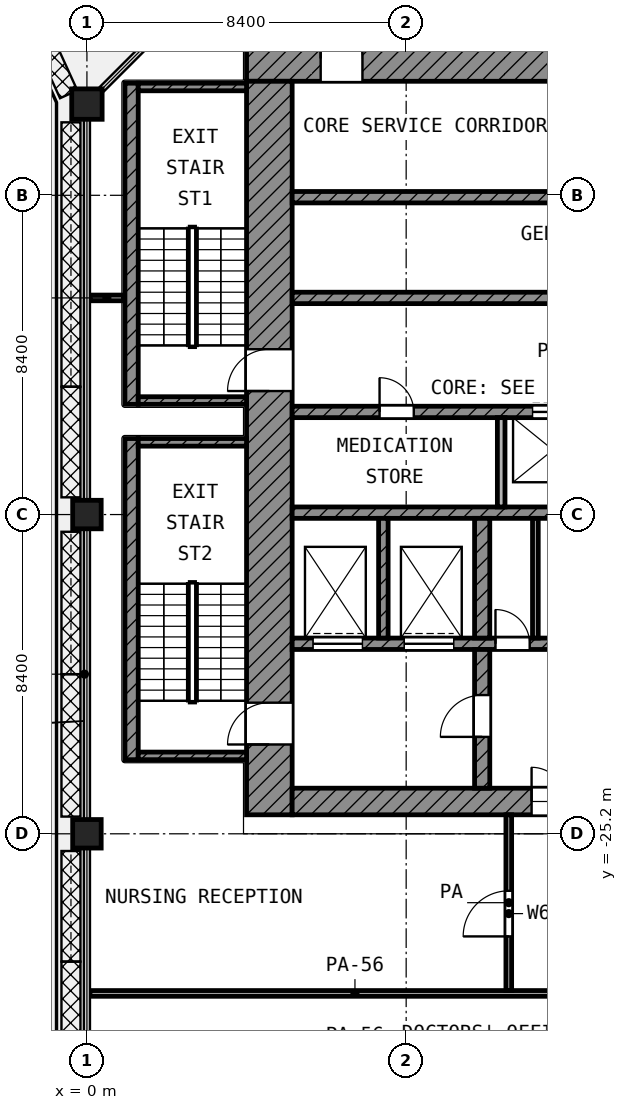
"""IFC4 building model, lengths in metres.
Left out: names, types, materials, properties, quantities, classifications, styles, units other than length and angle.
Written with IfcOpenShell. Run it as: python <this file> out.ifc"""

import sys

from ifc_helpers import new_model, si_unit, direction, frame, frame_2d, origin, origin_2d, place, context, subcontext, project, spatial, rectangle, extrude, element, fill, save


model = new_model("IFC4")
c1 = context("Model", 3, precision=1e-05, world=origin(), true_north=direction((0.0, 1.0)))
c2 = subcontext(c1, "Body", "Model", "MODEL_VIEW")
j1 = project(units=[si_unit("LENGTHUNIT", "METRE"), si_unit("PLANEANGLEUNIT", "RADIAN")], contexts=[c1])
p1 = place(None, origin())
s1 = spatial("IfcSite", under=j1, at=p1, CompositionType="ELEMENT")
p2 = place(p1, origin())
s2 = spatial("IfcBuilding", under=s1, at=p2, CompositionType="ELEMENT")
p3 = place(p2, frame((0.0, 0.0, 298.6)))
s3 = spatial("IfcBuildingStorey", under=s2, at=p3, CompositionType="ELEMENT", Elevation=298.6)
p4 = place(p3, frame((0.0, -6.0, 0.0), z_axis=(0.0, 0.0, 1.0), x_axis=(1.0, 0.0, 0.0)))
e1 = element("IfcColumn", 1, at=p4, inside=s3, PredefinedType="COLUMN", context=c2, shape_type="SweptSolid", body=[
    extrude(rectangle(XDim=0.8, YDim=0.8, at=origin_2d()), origin(), (0.0, 0.0, 1.0), 4.2),
])
for number, where, z_axis, x_axis in (
    (2, (0.0, -16.8, 0.0), (0.0, 0.0, 1.0), (1.0, 0.0, 0.0)),
    (3, (0.0, -25.2, 0.0), (0.0, 0.0, 1.0), (1.0, 0.0, 0.0)),
):
    element("IfcColumn", number, at=place(p3, frame(where, z_axis=z_axis, x_axis=x_axis)), inside=s3, PredefinedType="COLUMN", context=c2, shape_type="SweptSolid", body=[
        extrude(rectangle(XDim=0.75, YDim=0.75, at=origin_2d()), origin(), (0.0, 0.0, 1.0), 4.2),
    ])
p5 = place(p3, frame((4.2, -4.8, 0.0), z_axis=(0.0, 0.0, 1.0), x_axis=(1.0, 0.0, 0.0)))
e4 = element("IfcWall", 4, at=p5, inside=s3, PredefinedType="SHEAR", context=c2, shape_type="SweptSolid", body=[
    extrude(rectangle(XDim=20.5, YDim=1.2, at=frame_2d((10.25, 0.0))), origin(), (0.0, 0.0, 1.0), 3.6),
])
p6 = place(p5, frame((1.95, 0.0, 0.0)))
e5 = element("IfcOpeningElement", 5, at=p6, cuts=e4, PredefinedType="OPENING", context=c2, shape_type="SweptSolid", body=[
    extrude(rectangle(XDim=1.1, YDim=2.1, at=frame_2d((0.55, 1.05))), frame((0.0, 0.61, 0.0), z_axis=(0.0, -1.0, 0.0), x_axis=(1.0, 0.0, 0.0)), (0.0, 0.0, 1.0), 1.22),
])
p7 = place(p5, frame((17.95, 0.0, 0.0)))
e6 = element("IfcOpeningElement", 6, at=p7, cuts=e4, PredefinedType="OPENING", context=c2, shape_type="SweptSolid", body=[
    extrude(rectangle(XDim=1.1, YDim=2.1, at=frame_2d((0.55, 1.05))), frame((0.0, 0.61, 0.0), z_axis=(0.0, -1.0, 0.0), x_axis=(1.0, 0.0, 0.0)), (0.0, 0.0, 1.0), 1.22),
])
p8 = place(p3, frame((4.8, -24.7, 0.0), z_axis=(0.0, 0.0, 1.0), x_axis=(0.0, 1.0, 0.0)))
e7 = element("IfcWall", 7, at=p8, inside=s3, PredefinedType="SHEAR", context=c2, shape_type="SweptSolid", body=[
    extrude(rectangle(XDim=19.3, YDim=1.2, at=frame_2d((9.65, 0.0))), origin(), (0.0, 0.0, 1.0), 3.6),
])
p9 = place(p8, frame((11.15, 0.0, 0.0)))
e8 = element("IfcOpeningElement", 8, at=p9, cuts=e7, PredefinedType="OPENING", context=c2, shape_type="SweptSolid", body=[
    extrude(rectangle(XDim=1.1, YDim=2.1, at=frame_2d((0.55, 1.05))), frame((0.0, 0.61, 0.0), z_axis=(0.0, -1.0, 0.0), x_axis=(1.0, 0.0, 0.0)), (0.0, 0.0, 1.0), 1.22),
])
p10 = place(p8, frame((1.85, 0.0, 0.0)))
e9 = element("IfcOpeningElement", 9, at=p10, cuts=e7, PredefinedType="OPENING", context=c2, shape_type="SweptSolid", body=[
    extrude(rectangle(XDim=1.1, YDim=2.1, at=frame_2d((0.55, 1.05))), frame((0.0, 0.61, 0.0), z_axis=(0.0, -1.0, 0.0), x_axis=(1.0, 0.0, 0.0)), (0.0, 0.0, 1.0), 1.22),
])
p11 = place(p3, frame((5.4, -24.35, 0.0), z_axis=(0.0, 0.0, 1.0), x_axis=(1.0, 0.0, 0.0)))
e10 = element("IfcWall", 10, at=p11, inside=s3, PredefinedType="SHEAR", context=c2, shape_type="SweptSolid", body=[
    extrude(rectangle(XDim=18.6, YDim=0.7, at=frame_2d((9.3, 0.0))), origin(), (0.0, 0.0, 1.0), 3.6),
])
p12 = place(p11, frame((6.3, 0.0, 0.0)))
e11 = element("IfcOpeningElement", 11, at=p12, cuts=e10, PredefinedType="OPENING", context=c2, shape_type="SweptSolid", body=[
    extrude(rectangle(XDim=1.8, YDim=2.1, at=frame_2d((0.9, 1.05))), frame((0.0, 0.36, 0.0), z_axis=(0.0, -1.0, 0.0), x_axis=(1.0, 0.0, 0.0)), (0.0, 0.0, 1.0), 0.72),
])
p13 = place(p3, frame((5.4, -8.45, 0.0), z_axis=(0.0, 0.0, 1.0), x_axis=(1.0, 0.0, 0.0)))
e12 = element("IfcWall", 12, at=p13, inside=s3, PredefinedType="SHEAR", context=c2, shape_type="SweptSolid", body=[
    extrude(rectangle(XDim=16.65, YDim=0.3, at=frame_2d((8.325, 0.0))), origin(), (0.0, 0.0, 1.0), 3.6),
])
p14 = place(p3, frame((5.4, -11.1, 0.0), z_axis=(0.0, 0.0, 1.0), x_axis=(1.0, 0.0, 0.0)))
e13 = element("IfcWall", 13, at=p14, inside=s3, PredefinedType="SHEAR", context=c2, shape_type="SweptSolid", body=[
    extrude(rectangle(XDim=16.65, YDim=0.3, at=frame_2d((8.325, 0.0))), origin(), (0.0, 0.0, 1.0), 3.6),
])
p15 = place(p14, frame((7.8, 0.0, 0.0)))
e14 = element("IfcOpeningElement", 14, at=p15, cuts=e13, PredefinedType="OPENING", context=c2, shape_type="SweptSolid", body=[
    extrude(rectangle(XDim=0.9, YDim=2.1, at=frame_2d((0.45, 1.05))), frame((0.0, 0.16, 0.0), z_axis=(0.0, -1.0, 0.0), x_axis=(1.0, 0.0, 0.0)), (0.0, 0.0, 1.0), 0.32),
])
p16 = place(p3, frame((5.4, -14.1, 0.0), z_axis=(0.0, 0.0, 1.0), x_axis=(1.0, 0.0, 0.0)))
e15 = element("IfcWall", 15, at=p16, inside=s3, PredefinedType="SHEAR", context=c2, shape_type="SweptSolid", body=[
    extrude(rectangle(XDim=16.65, YDim=0.3, at=frame_2d((8.325, 0.0))), origin(), (0.0, 0.0, 1.0), 3.6),
])
p17 = place(p16, frame((6.325, 0.0, 0.0)))
e16 = element("IfcOpeningElement", 16, at=p17, cuts=e15, PredefinedType="OPENING", context=c2, shape_type="SweptSolid", body=[
    extrude(rectangle(XDim=1.1, YDim=2.1, at=frame_2d((0.55, 1.05))), frame((0.0, 0.16, 0.0), z_axis=(0.0, -1.0, 0.0), x_axis=(1.0, 0.0, 0.0)), (0.0, 0.0, 1.0), 0.32),
])
p18 = place(p16, frame((9.075, 0.0, 0.0)))
e17 = element("IfcOpeningElement", 17, at=p18, cuts=e15, PredefinedType="OPENING", context=c2, shape_type="SweptSolid", body=[
    extrude(rectangle(XDim=1.1, YDim=2.1, at=frame_2d((0.55, 1.05))), frame((0.0, 0.16, 0.0), z_axis=(0.0, -1.0, 0.0), x_axis=(1.0, 0.0, 0.0)), (0.0, 0.0, 1.0), 0.32),
])
p19 = place(p16, frame((11.825, 0.0, 0.0)))
e18 = element("IfcOpeningElement", 18, at=p19, cuts=e15, PredefinedType="OPENING", context=c2, shape_type="SweptSolid", body=[
    extrude(rectangle(XDim=1.1, YDim=2.1, at=frame_2d((0.55, 1.05))), frame((0.0, 0.16, 0.0), z_axis=(0.0, -1.0, 0.0), x_axis=(1.0, 0.0, 0.0)), (0.0, 0.0, 1.0), 0.32),
])
p20 = place(p16, frame((14.575, 0.0, 0.0)))
e19 = element("IfcOpeningElement", 19, at=p20, cuts=e15, PredefinedType="OPENING", context=c2, shape_type="SweptSolid", body=[
    extrude(rectangle(XDim=1.1, YDim=2.1, at=frame_2d((0.55, 1.05))), frame((0.0, 0.16, 0.0), z_axis=(0.0, -1.0, 0.0), x_axis=(1.0, 0.0, 0.0)), (0.0, 0.0, 1.0), 0.32),
])
p21 = place(p16, frame((2.3, 0.0, 0.0)))
e20 = element("IfcOpeningElement", 20, at=p21, cuts=e15, PredefinedType="OPENING", context=c2, shape_type="SweptSolid", body=[
    extrude(rectangle(XDim=0.9, YDim=2.1, at=frame_2d((0.45, 1.05))), frame((0.0, 0.16, 0.0), z_axis=(0.0, -1.0, 0.0), x_axis=(1.0, 0.0, 0.0)), (0.0, 0.0, 1.0), 0.32),
])
p22 = place(p3, frame((5.4, -16.75, 0.0), z_axis=(0.0, 0.0, 1.0), x_axis=(1.0, 0.0, 0.0)))
e21 = element("IfcWall", 21, at=p22, inside=s3, PredefinedType="SHEAR", context=c2, shape_type="SweptSolid", body=[
    extrude(rectangle(XDim=16.65, YDim=0.3, at=frame_2d((8.325, 0.0))), origin(), (0.0, 0.0, 1.0), 3.6),
])
p23 = place(p3, frame((5.4, -20.2, 0.0), z_axis=(0.0, 0.0, 1.0), x_axis=(1.0, 0.0, 0.0)))
e22 = element("IfcWall", 22, at=p23, inside=s3, PredefinedType="SHEAR", context=c2, shape_type="SweptSolid", body=[
    extrude(rectangle(XDim=14.65, YDim=0.3, at=frame_2d((7.325, 0.0))), origin(), (0.0, 0.0, 1.0), 3.6),
])
p24 = place(p23, frame((10.55, 0.0, 0.0)))
e23 = element("IfcOpeningElement", 23, at=p24, cuts=e22, PredefinedType="OPENING", context=c2, shape_type="SweptSolid", body=[
    extrude(rectangle(XDim=1.3, YDim=2.1, at=frame_2d((0.65, 1.05))), frame((0.0, 0.16, 0.0), z_axis=(0.0, -1.0, 0.0), x_axis=(1.0, 0.0, 0.0)), (0.0, 0.0, 1.0), 0.32),
])
p25 = place(p23, frame((12.95, 0.0, 0.0)))
e24 = element("IfcOpeningElement", 24, at=p25, cuts=e22, PredefinedType="OPENING", context=c2, shape_type="SweptSolid", body=[
    extrude(rectangle(XDim=1.3, YDim=2.1, at=frame_2d((0.65, 1.05))), frame((0.0, 0.16, 0.0), z_axis=(0.0, -1.0, 0.0), x_axis=(1.0, 0.0, 0.0)), (0.0, 0.0, 1.0), 0.32),
])
p26 = place(p23, frame((0.55, 0.0, 0.0)))
e25 = element("IfcOpeningElement", 25, at=p26, cuts=e22, PredefinedType="OPENING", context=c2, shape_type="SweptSolid", body=[
    extrude(rectangle(XDim=1.3, YDim=2.1, at=frame_2d((0.65, 1.05))), frame((0.0, 0.16, 0.0), z_axis=(0.0, -1.0, 0.0), x_axis=(1.0, 0.0, 0.0)), (0.0, 0.0, 1.0), 0.32),
])
p27 = place(p23, frame((2.95, 0.0, 0.0)))
e26 = element("IfcOpeningElement", 26, at=p27, cuts=e22, PredefinedType="OPENING", context=c2, shape_type="SweptSolid", body=[
    extrude(rectangle(XDim=1.3, YDim=2.1, at=frame_2d((0.65, 1.05))), frame((0.0, 0.16, 0.0), z_axis=(0.0, -1.0, 0.0), x_axis=(1.0, 0.0, 0.0)), (0.0, 0.0, 1.0), 0.32),
])
p28 = place(p23, frame((5.35, 0.0, 0.0)))
e27 = element("IfcOpeningElement", 27, at=p28, cuts=e22, PredefinedType="OPENING", context=c2, shape_type="SweptSolid", body=[
    extrude(rectangle(XDim=0.9, YDim=2.1, at=frame_2d((0.45, 1.05))), frame((0.0, 0.16, 0.0), z_axis=(0.0, -1.0, 0.0), x_axis=(1.0, 0.0, 0.0)), (0.0, 0.0, 1.0), 0.32),
])
p29 = place(p23, frame((7.75, 0.0, 0.0)))
e28 = element("IfcOpeningElement", 28, at=p29, cuts=e22, PredefinedType="OPENING", context=c2, shape_type="SweptSolid", body=[
    extrude(rectangle(XDim=0.9, YDim=2.1, at=frame_2d((0.45, 1.05))), frame((0.0, 0.16, 0.0), z_axis=(0.0, -1.0, 0.0), x_axis=(1.0, 0.0, 0.0)), (0.0, 0.0, 1.0), 0.32),
])
p30 = place(p3, frame((10.4, -24.0, 0.0), z_axis=(0.0, 0.0, 1.0), x_axis=(0.0, 1.0, 0.0)))
e29 = element("IfcWall", 29, at=p30, inside=s3, PredefinedType="SHEAR", context=c2, shape_type="SweptSolid", body=[
    extrude(rectangle(XDim=3.65, YDim=0.4, at=frame_2d((1.825, 0.0))), origin(), (0.0, 0.0, 1.0), 3.6),
])
p31 = place(p30, frame((1.35, 0.0, 0.0)))
e30 = element("IfcOpeningElement", 30, at=p31, cuts=e29, PredefinedType="OPENING", context=c2, shape_type="SweptSolid", body=[
    extrude(rectangle(XDim=1.1, YDim=2.1, at=frame_2d((0.55, 1.05))), frame((0.0, 0.21, 0.0), z_axis=(0.0, -1.0, 0.0), x_axis=(1.0, 0.0, 0.0)), (0.0, 0.0, 1.0), 0.42),
])
p32 = place(p3, frame((10.4, -20.05, 0.0), z_axis=(0.0, 0.0, 1.0), x_axis=(0.0, 1.0, 0.0)))
e31 = element("IfcWall", 31, at=p32, inside=s3, PredefinedType="SHEAR", context=c2, shape_type="SweptSolid", body=[
    extrude(rectangle(XDim=3.15, YDim=0.4, at=frame_2d((1.575, 0.0))), origin(), (0.0, 0.0, 1.0), 3.6),
])
p33 = place(p3, frame((7.8, -20.05, 0.0), z_axis=(0.0, 0.0, 1.0), x_axis=(0.0, 1.0, 0.0)))
e32 = element("IfcWall", 32, at=p33, inside=s3, PredefinedType="SHEAR", context=c2, shape_type="SweptSolid", body=[
    extrude(rectangle(XDim=3.15, YDim=0.25, at=frame_2d((1.575, 0.0))), origin(), (0.0, 0.0, 1.0), 3.6),
])
p34 = place(p3, frame((10.9, -16.6, 0.0), z_axis=(0.0, 0.0, 1.0), x_axis=(0.0, 1.0, 0.0)))
e33 = element("IfcWall", 33, at=p34, inside=s3, PredefinedType="PARTITIONING", context=c2, shape_type="SweptSolid", body=[
    extrude(rectangle(XDim=2.35, YDim=0.2, at=frame_2d((1.175, 0.0))), origin(), (0.0, 0.0, 1.0), 3.6),
])
p35 = place(p3, frame((11.8, -20.05, 0.0), z_axis=(0.0, 0.0, 1.0), x_axis=(0.0, 1.0, 0.0)))
e34 = element("IfcWall", 34, at=p35, inside=s3, PredefinedType="PARTITIONING", context=c2, shape_type="SweptSolid", body=[
    extrude(rectangle(XDim=3.15, YDim=0.15, at=frame_2d((1.575, 0.0))), origin(), (0.0, 0.0, 1.0), 3.6),
])
p36 = place(p3, frame((1.175, -13.9, 0.0), z_axis=(0.0, 0.0, 1.0), x_axis=(0.0, 1.0, 0.0)))
e35 = element("IfcWall", 35, at=p36, inside=s3, PredefinedType="SHEAR", context=c2, shape_type="SweptSolid", body=[
    extrude(rectangle(XDim=8.45, YDim=0.35, at=frame_2d((4.225, 0.0))), origin(), (0.0, 0.0, 1.0), 3.6),
])
for number, where, z_axis, x_axis in (
    (36, (1.35, -5.55, 0.0), (0.0, 0.0, 1.0), (1.0, 0.0, 0.0)),
    (37, (1.35, -13.8, 0.0), (0.0, 0.0, 1.0), (1.0, 0.0, 0.0)),
):
    element("IfcWall", number, at=place(p3, frame(where, z_axis=z_axis, x_axis=x_axis)), inside=s3, PredefinedType="SHEAR", context=c2, shape_type="SweptSolid", body=[
        extrude(rectangle(XDim=2.85, YDim=0.2, at=frame_2d((1.425, 0.0))), origin(), (0.0, 0.0, 1.0), 3.6),
    ])
p37 = place(p3, frame((1.175, -23.25, 0.0), z_axis=(0.0, 0.0, 1.0), x_axis=(0.0, 1.0, 0.0)))
e38 = element("IfcWall", 38, at=p37, inside=s3, PredefinedType="SHEAR", context=c2, shape_type="SweptSolid", body=[
    extrude(rectangle(XDim=8.45, YDim=0.35, at=frame_2d((4.225, 0.0))), origin(), (0.0, 0.0, 1.0), 3.6),
])
for number, where, z_axis, x_axis in (
    (39, (1.35, -14.9, 0.0), (0.0, 0.0, 1.0), (1.0, 0.0, 0.0)),
    (40, (1.35, -23.15, 0.0), (0.0, 0.0, 1.0), (1.0, 0.0, 0.0)),
):
    element("IfcWall", number, at=place(p3, frame(where, z_axis=z_axis, x_axis=x_axis)), inside=s3, PredefinedType="SHEAR", context=c2, shape_type="SweptSolid", body=[
        extrude(rectangle(XDim=2.85, YDim=0.2, at=frame_2d((1.425, 0.0))), origin(), (0.0, 0.0, 1.0), 3.6),
    ])
p38 = place(p3, frame((0.08, -29.4, 0.0), z_axis=(0.0, 0.0, 1.0), x_axis=(1.0, 0.0, 0.0)))
e41 = element("IfcWall", 41, at=p38, inside=s3, PredefinedType="PARTITIONING", context=c2, shape_type="SweptSolid", body=[
    extrude(rectangle(XDim=13.945, YDim=0.15, at=frame_2d((6.972, 0.0))), origin(), (0.0, 0.0, 1.0), 2.7),
])
p39 = place(p3, frame((0.08, -11.1, 0.0), z_axis=(0.0, 0.0, 1.0), x_axis=(1.0, 0.0, 0.0)))
e42 = element("IfcWall", 42, at=p39, inside=s3, PredefinedType="PARTITIONING", context=c2, shape_type="SweptSolid", body=[
    extrude(rectangle(XDim=0.89, YDim=0.15, at=frame_2d((0.445, 0.0))), origin(), (0.0, 0.0, 1.0), 2.7),
])
p40 = place(p3, frame((11.1, -29.325, 0.0), z_axis=(0.0, 0.0, 1.0), x_axis=(0.0, 1.0, 0.0)))
e43 = element("IfcWall", 43, at=p40, inside=s3, PredefinedType="PARTITIONING", context=c2, shape_type="SweptSolid", body=[
    extrude(rectangle(XDim=4.625, YDim=0.15, at=frame_2d((2.312, 0.0))), origin(), (0.0, 0.0, 1.0), 3.6),
])
p41 = place(p40, frame((1.425, 0.0, 0.0)))
e44 = element("IfcOpeningElement", 44, at=p41, cuts=e43, PredefinedType="OPENING", context=c2, shape_type="SweptSolid", body=[
    extrude(rectangle(XDim=1.2, YDim=2.1, at=frame_2d((0.6, 1.05))), frame((0.0, 0.085, 0.0), z_axis=(0.0, -1.0, 0.0), x_axis=(1.0, 0.0, 0.0)), (0.0, 0.0, 1.0), 0.17),
])
p42 = place(p17, origin())
e45 = element("IfcDoor", 45, at=p42, inside=s3, OperationType="DOUBLE_DOOR_SLIDING", PredefinedType="DOOR", context=c2, shape_type="SweptSolid", body=[
    extrude(rectangle(XDim=1.1, YDim=2.1, at=frame_2d((0.55, 1.05))), frame((0.0, 0.025, 0.0), z_axis=(0.0, -1.0, 0.0), x_axis=(1.0, 0.0, 0.0)), (0.0, 0.0, 1.0), 0.05),
])
fill(e16, e45)
p43 = place(p26, origin())
e46 = element("IfcDoor", 46, at=p43, inside=s3, OperationType="DOUBLE_DOOR_SLIDING", PredefinedType="DOOR", context=c2, shape_type="SweptSolid", body=[
    extrude(rectangle(XDim=1.3, YDim=2.1, at=frame_2d((0.65, 1.05))), frame((0.0, 0.025, 0.0), z_axis=(0.0, -1.0, 0.0), x_axis=(1.0, 0.0, 0.0)), (0.0, 0.0, 1.0), 0.05),
])
fill(e25, e46)
p44 = place(p27, origin())
e47 = element("IfcDoor", 47, at=p44, inside=s3, OperationType="DOUBLE_DOOR_SLIDING", PredefinedType="DOOR", context=c2, shape_type="SweptSolid", body=[
    extrude(rectangle(XDim=1.3, YDim=2.1, at=frame_2d((0.65, 1.05))), frame((0.0, 0.025, 0.0), z_axis=(0.0, -1.0, 0.0), x_axis=(1.0, 0.0, 0.0)), (0.0, 0.0, 1.0), 0.05),
])
fill(e26, e47)
p45 = place(p9, origin())
e48 = element("IfcDoor", 48, at=p45, inside=s3, OperationType="SINGLE_SWING_LEFT", PredefinedType="DOOR", context=c2, shape_type="SweptSolid", body=[
    extrude(rectangle(XDim=1.1, YDim=2.1, at=frame_2d((0.55, 1.05))), frame((0.0, 0.025, 0.0), z_axis=(0.0, -1.0, 0.0), x_axis=(1.0, 0.0, 0.0)), (0.0, 0.0, 1.0), 0.05),
])
fill(e8, e48)
p46 = place(p10, origin())
e49 = element("IfcDoor", 49, at=p46, inside=s3, OperationType="SINGLE_SWING_LEFT", PredefinedType="DOOR", context=c2, shape_type="SweptSolid", body=[
    extrude(rectangle(XDim=1.1, YDim=2.1, at=frame_2d((0.55, 1.05))), frame((0.0, 0.025, 0.0), z_axis=(0.0, -1.0, 0.0), x_axis=(1.0, 0.0, 0.0)), (0.0, 0.0, 1.0), 0.05),
])
fill(e9, e49)
p47 = place(p6, origin())
e50 = element("IfcDoor", 50, at=p47, inside=s3, OperationType="SINGLE_SWING_LEFT", PredefinedType="DOOR", context=c2, shape_type="SweptSolid", body=[
    extrude(rectangle(XDim=1.1, YDim=2.1, at=frame_2d((0.55, 1.05))), frame((0.0, 0.025, 0.0), z_axis=(0.0, -1.0, 0.0), x_axis=(1.0, 0.0, 0.0)), (0.0, 0.0, 1.0), 0.05),
])
fill(e5, e50)
p48 = place(p31, origin())
e51 = element("IfcDoor", 51, at=p48, inside=s3, OperationType="SINGLE_SWING_LEFT", PredefinedType="DOOR", context=c2, shape_type="SweptSolid", body=[
    extrude(rectangle(XDim=1.1, YDim=2.1, at=frame_2d((0.55, 1.05))), frame((0.0, 0.025, 0.0), z_axis=(0.0, -1.0, 0.0), x_axis=(1.0, 0.0, 0.0)), (0.0, 0.0, 1.0), 0.05),
])
fill(e30, e51)
p49 = place(p12, origin())
e52 = element("IfcDoor", 52, at=p49, inside=s3, OperationType="DOUBLE_DOOR_SINGLE_SWING", PredefinedType="DOOR", context=c2, shape_type="SweptSolid", body=[
    extrude(rectangle(XDim=1.8, YDim=2.1, at=frame_2d((0.9, 1.05))), frame((0.0, 0.025, 0.0), z_axis=(0.0, -1.0, 0.0), x_axis=(1.0, 0.0, 0.0)), (0.0, 0.0, 1.0), 0.05),
])
fill(e11, e52)
p50 = place(p28, origin())
e53 = element("IfcDoor", 53, at=p50, inside=s3, OperationType="SINGLE_SWING_LEFT", PredefinedType="DOOR", context=c2, shape_type="SweptSolid", body=[
    extrude(rectangle(XDim=0.9, YDim=2.1, at=frame_2d((0.45, 1.05))), frame((0.0, 0.025, 0.0), z_axis=(0.0, -1.0, 0.0), x_axis=(1.0, 0.0, 0.0)), (0.0, 0.0, 1.0), 0.05),
])
fill(e27, e53)
p51 = place(p21, origin())
e54 = element("IfcDoor", 54, at=p51, inside=s3, OperationType="SINGLE_SWING_LEFT", PredefinedType="DOOR", context=c2, shape_type="SweptSolid", body=[
    extrude(rectangle(XDim=0.9, YDim=2.1, at=frame_2d((0.45, 1.05))), frame((0.0, 0.025, 0.0), z_axis=(0.0, -1.0, 0.0), x_axis=(1.0, 0.0, 0.0)), (0.0, 0.0, 1.0), 0.05),
])
fill(e20, e54)
p52 = place(p41, origin())
e55 = element("IfcDoor", 55, at=p52, inside=s3, OperationType="SINGLE_SWING_LEFT", PredefinedType="DOOR", context=c2, shape_type="SweptSolid", body=[
    extrude(rectangle(XDim=1.2, YDim=2.1, at=frame_2d((0.6, 1.05))), frame((0.0, 0.025, 0.0), z_axis=(0.0, -1.0, 0.0), x_axis=(1.0, 0.0, 0.0)), (0.0, 0.0, 1.0), 0.05),
])
fill(e44, e55)
save(model, sys.argv[1])
